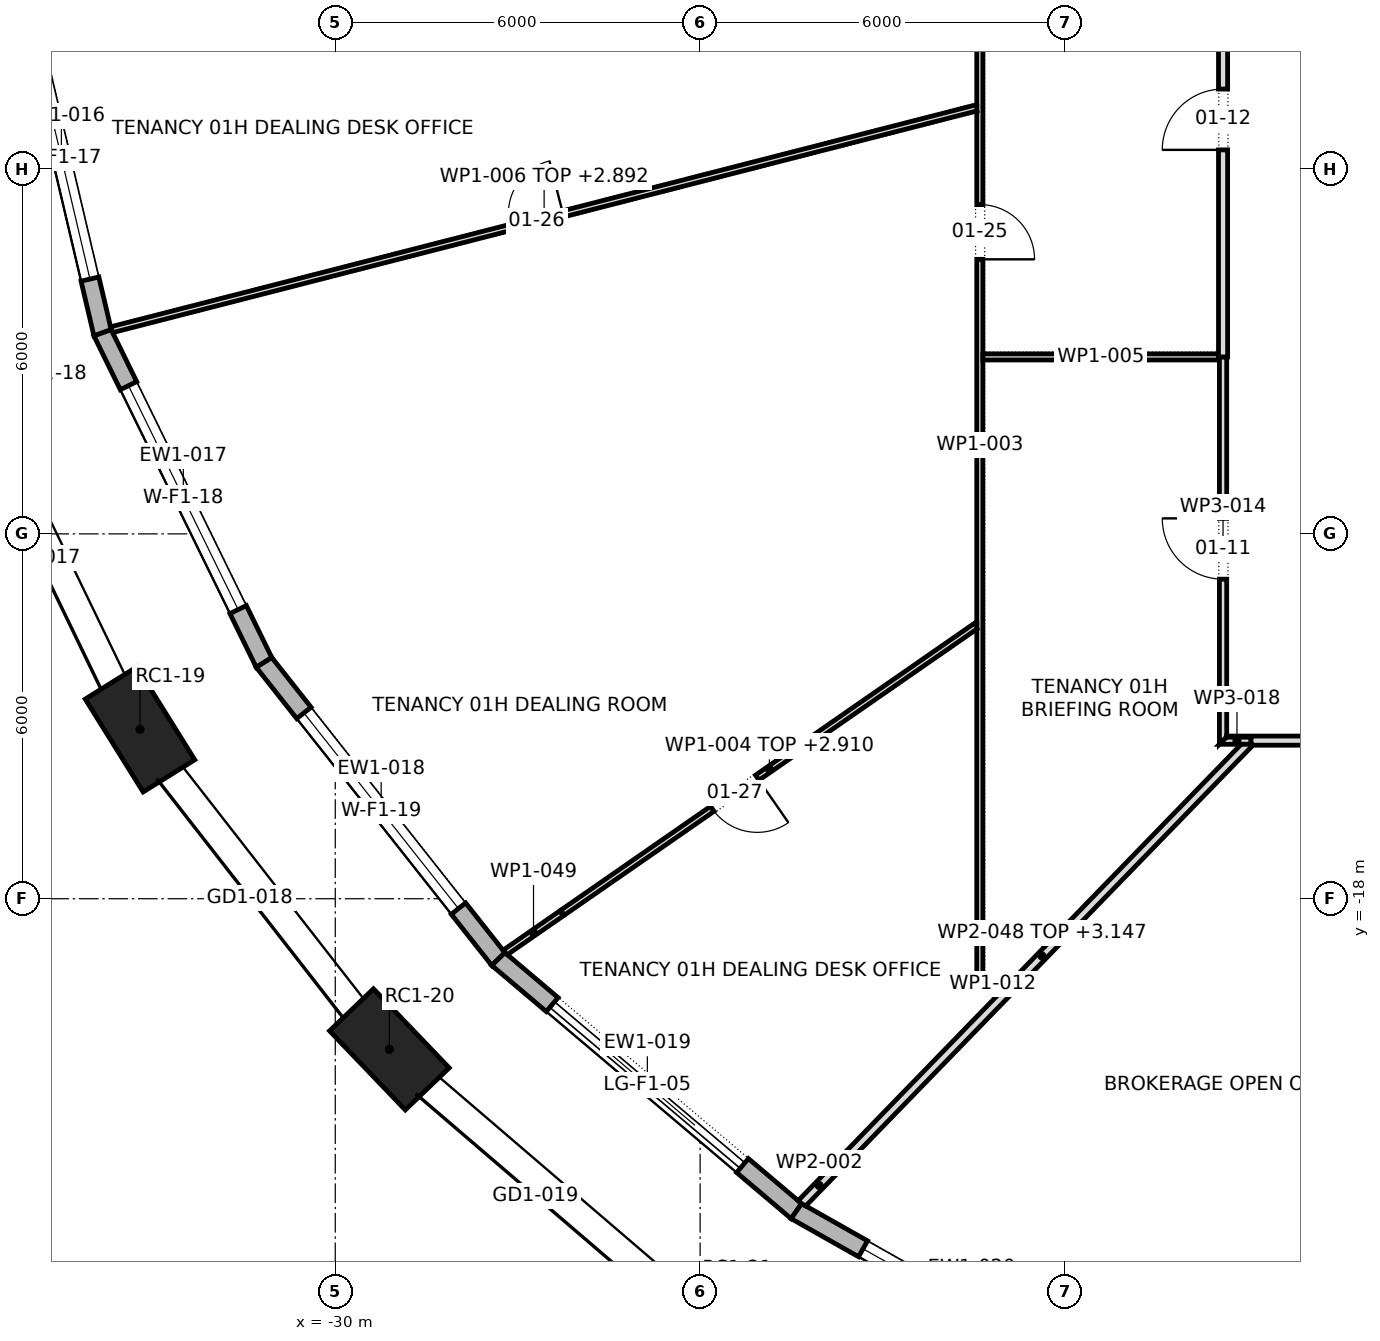
"""IFC4 building model, lengths in metres.
Left out: names, types, materials, properties, quantities, classifications, styles, units other than length and angle.
Written with IfcOpenShell. Run it as: python <this file> out.ifc"""

import sys

from ifc_helpers import new_model, si_unit, direction, frame, frame_2d, origin, origin_2d, place, context, subcontext, project, spatial, polyline, rectangle, outline, extrude, element, fill, save


model = new_model("IFC4")
c1 = context("Model", 3, precision=1e-05, world=origin(), true_north=direction((0.0, 1.0)))
c2 = subcontext(c1, "Body", "Model", "MODEL_VIEW")
j1 = project(units=[si_unit("LENGTHUNIT", "METRE"), si_unit("PLANEANGLEUNIT", "RADIAN")], contexts=[c1])
p1 = place(None, origin())
s1 = spatial("IfcSite", under=j1, at=p1, CompositionType="ELEMENT")
p2 = place(p1, origin())
s2 = spatial("IfcBuilding", under=s1, at=p2, CompositionType="ELEMENT")
p3 = place(p2, frame((0.0, 0.0, 31.9)))
s3 = spatial("IfcBuildingStorey", under=s2, at=p3, CompositionType="ELEMENT", Elevation=31.9)
for number, where, z_axis, x_axis in (
    (1, (-33.211, -15.216, 0.0), (0.0, 0.0, 1.0), (0.529, -0.849, 0.0)),
    (2, (-29.11, -20.477, 0.0), (0.0, 0.0, 1.0), (0.692, -0.722, 0.0)),
):
    element("IfcColumn", number, at=place(p3, frame(where, z_axis=z_axis, x_axis=x_axis)), inside=s3, PredefinedType="COLUMN", context=c2, shape_type="SweptSolid", body=[
        extrude(rectangle(XDim=1.8, YDim=1.0, at=origin_2d()), origin(), (0.0, 0.0, 1.0), 4.2),
    ])
p4 = place(p3, frame((-35.18, -2.936, 0.0), z_axis=(0.0, 0.0, 1.0), x_axis=(0.228924296831, -0.973444228665, 0.0)))
e3 = element("IfcWall", 3, at=p4, inside=s3, PredefinedType="STANDARD", context=c2, shape_type="SweptSolid", body=[
    extrude(outline(polyline([(-0.017, -0.15), (5.931, -0.15), (5.898, 0.15), (0.017, 0.15), (-0.017, -0.15)])), origin(), (0.0, 0.0, 1.0), 3.9),
])
p5 = place(p4, frame((0.907, 0.0, 0.6)))
e4 = element("IfcOpeningElement", 4, at=p5, cuts=e3, PredefinedType="OPENING", context=c2, shape_type="SweptSolid", body=[
    extrude(rectangle(XDim=4.1, YDim=2.85, at=frame_2d((2.05, 1.425))), frame((0.0, 0.162, 0.0), z_axis=(0.0, -1.0, 0.0), x_axis=(1.0, 0.0, 0.0)), (0.0, 0.0, 1.0), 0.324),
])
p6 = place(p3, frame((-33.826, -8.693, 0.0), z_axis=(0.0, 0.0, 1.0), x_axis=(0.439821516427, -0.898085204025, 0.0)))
e5 = element("IfcWall", 5, at=p6, inside=s3, PredefinedType="STANDARD", context=c2, shape_type="SweptSolid", body=[
    extrude(outline(polyline([(-0.017, -0.15), (6.053, -0.15), (6.021, 0.15), (0.017, 0.15), (-0.017, -0.15)])), origin(), (0.0, 0.0, 1.0), 3.9),
])
p7 = place(p6, frame((0.969, 0.0, 0.6)))
e6 = element("IfcOpeningElement", 6, at=p7, cuts=e5, PredefinedType="OPENING", context=c2, shape_type="SweptSolid", body=[
    extrude(rectangle(XDim=4.1, YDim=2.85, at=frame_2d((2.05, 1.425))), frame((0.0, 0.162, 0.0), z_axis=(0.0, -1.0, 0.0), x_axis=(1.0, 0.0, 0.0)), (0.0, 0.0, 1.0), 0.324),
])
p8 = place(p3, frame((-31.171, -14.115, 0.0), z_axis=(0.0, 0.0, 1.0), x_axis=(0.619902786528, -0.784678619089, 0.0)))
e7 = element("IfcWall", 7, at=p8, inside=s3, PredefinedType="STANDARD", context=c2, shape_type="SweptSolid", body=[
    extrude(outline(polyline([(-0.016, -0.15), (6.231, -0.15), (6.2, 0.15), (0.016, 0.15), (-0.016, -0.15)])), origin(), (0.0, 0.0, 1.0), 3.9),
])
p9 = place(p8, frame((1.058, 0.0, 0.6)))
e8 = element("IfcOpeningElement", 8, at=p9, cuts=e7, PredefinedType="OPENING", context=c2, shape_type="SweptSolid", body=[
    extrude(rectangle(XDim=4.1, YDim=2.85, at=frame_2d((2.05, 1.425))), frame((0.0, 0.162, 0.0), z_axis=(0.0, -1.0, 0.0), x_axis=(1.0, 0.0, 0.0)), (0.0, 0.0, 1.0), 0.324),
])
p10 = place(p3, frame((-27.318, -18.992, 0.0), z_axis=(0.0, 0.0, 1.0), x_axis=(0.763540615407, -0.645759807223, 0.0)))
e9 = element("IfcWall", 9, at=p10, inside=s3, PredefinedType="STANDARD", context=c2, shape_type="SweptSolid", body=[
    extrude(outline(polyline([(-0.015, -0.15), (6.434, -0.15), (6.406, 0.15), (0.015, 0.15), (-0.015, -0.15)])), origin(), (0.0, 0.0, 1.0), 3.9),
])
p11 = place(p10, frame((1.16, 0.0, 0.0)))
e10 = element("IfcOpeningElement", 10, at=p11, cuts=e9, PredefinedType="OPENING", context=c2, shape_type="SweptSolid", body=[
    extrude(rectangle(XDim=4.1, YDim=3.45, at=frame_2d((2.05, 1.725))), frame((0.0, 0.162, 0.0), z_axis=(0.0, -1.0, 0.0), x_axis=(1.0, 0.0, 0.0)), (0.0, 0.0, 1.0), 0.324),
])
p12 = place(p3, frame((-22.417, -23.137, 0.0), z_axis=(0.0, 0.0, 1.0), x_axis=(0.8705786416, -0.492029296678, 0.0)))
e11 = element("IfcWall", 11, at=p12, inside=s3, PredefinedType="STANDARD", context=c2, shape_type="SweptSolid", body=[
    extrude(outline(polyline([(-0.014, -0.15), (6.631, -0.15), (6.604, 0.15), (0.014, 0.15), (-0.014, -0.15)])), origin(), (0.0, 0.0, 1.0), 3.9),
])
p13 = place(p12, frame((1.259, 0.0, 0.6)))
e12 = element("IfcOpeningElement", 12, at=p13, cuts=e11, PredefinedType="OPENING", context=c2, shape_type="SweptSolid", body=[
    extrude(rectangle(XDim=4.1, YDim=2.85, at=frame_2d((2.05, 1.425))), frame((0.0, 0.162, 0.0), z_axis=(0.0, -1.0, 0.0), x_axis=(1.0, 0.0, 0.0)), (0.0, 0.0, 1.0), 0.324),
])
p14 = place(p3, frame((-22.333, -23.018, 0.0), z_axis=(0.0, 0.0, 1.0), x_axis=(0.696297301531, 0.717753486846, 0.0)))
e13 = element("IfcWall", 13, at=p14, inside=s3, PredefinedType="PARTITIONING", context=c2, shape_type="SweptSolid", body=[
    extrude(outline(polyline([(0.0, 0.075), (0.0, 0.072), (0.005, 0.001), (0.025, -0.075), (0.831, -0.075), (0.831, 0.075), (0.0, 0.075)])), origin(), (0.0, 0.0, 1.0), 3.9),
])
p15 = place(p3, frame((-19.4, -19.45, 0.0), z_axis=(0.0, 0.0, 1.0), x_axis=(0.0, 1.0, 0.0)))
e14 = element("IfcWall", 14, at=p15, inside=s3, PredefinedType="PARTITIONING", context=c2, shape_type="SweptSolid", body=[
    extrude(outline(polyline([(0.1, -0.05), (1.802, -0.05), (3.503, -0.05), (5.205, -0.05), (6.907, -0.05), (8.608, -0.05), (10.31, -0.05), (10.31, -0.05), (10.41, -0.05), (10.41, -0.05), (12.25, -0.05), (14.089, -0.05), (15.929, -0.05), (17.769, -0.05), (17.769, -0.047), (17.761, 0.044), (17.769, 0.044), (17.769, 0.045), (17.751, 0.044), (17.75, 0.05), (16.082, 0.05), (14.413, 0.05), (14.406, 0.048), (14.406, 0.05), (12.702, 0.05), (10.999, 0.05), (9.296, 0.05), (7.593, 0.05), (5.89, 0.05), (5.886, 0.048), (5.885, 0.05), (3.923, 0.05), (1.961, 0.05), (0.0, 0.05), (0.1, -0.05), (0.1, -0.05)])), origin(), (0.0, 0.0, 1.0), 3.9),
])
p16 = place(p15, frame((11.965, 0.0, 0.0)))
e15 = element("IfcOpeningElement", 15, at=p16, cuts=e14, PredefinedType="OPENING", context=c2, shape_type="SweptSolid", body=[
    extrude(rectangle(XDim=0.9, YDim=2.1, at=frame_2d((0.45, 1.05))), frame((0.0, 0.062, 0.0), z_axis=(0.0, -1.0, 0.0), x_axis=(1.0, 0.0, 0.0)), (0.0, 0.0, 1.0), 0.124),
])
p17 = place(p3, frame((-19.422, -13.485, 0.0), z_axis=(0.0, 0.0, 1.0), x_axis=(-0.821712123272, -0.569902786858, 0.0)))
e16 = element("IfcWall", 16, at=p17, inside=s3, PredefinedType="PARTITIONING", context=c2, shape_type="SweptSolid", body=[
    extrude(outline(polyline([(8.335, 0.05), (6.682, 0.05), (5.029, 0.05), (3.375, 0.05), (1.722, 0.05), (0.069, 0.05), (0.0, -0.049), (0.0, -0.05), (1.667, -0.05), (3.334, -0.05), (5.001, -0.05), (6.668, -0.05), (8.335, -0.05), (8.335, 0.05)])), origin(), (0.0, 0.0, 1.0), 2.91),
])
p18 = place(p17, frame((4.428, 0.0, 0.0)))
e17 = element("IfcOpeningElement", 17, at=p18, cuts=e16, PredefinedType="OPENING", context=c2, shape_type="SweptSolid", body=[
    extrude(rectangle(XDim=0.9, YDim=2.1, at=frame_2d((0.45, 1.05))), frame((0.0, 0.062, 0.0), z_axis=(0.0, -1.0, 0.0), x_axis=(1.0, 0.0, 0.0)), (0.0, 0.0, 1.0), 0.124),
])
p19 = place(p3, frame((-19.35, -9.09, 0.0), z_axis=(0.0, 0.0, 1.0), x_axis=(1.0, 0.0, 0.0)))
e18 = element("IfcWall", 18, at=p19, inside=s3, PredefinedType="PARTITIONING", context=c2, shape_type="SweptSolid", body=[
    extrude(outline(polyline([(3.89, -0.05), (3.89, 0.0), (3.875, 0.0), (3.875, 0.05), (1.938, 0.05), (0.0, 0.05), (0.0, -0.05), (1.945, -0.05), (3.89, -0.05)])), origin(), (0.0, 0.0, 1.0), 3.9),
])
p20 = place(p3, frame((-19.438, -4.99, 0.0), z_axis=(0.0, 0.0, 1.0), x_axis=(-0.968638974519, -0.248472407007, 0.0)))
e19 = element("IfcWall", 19, at=p20, inside=s3, PredefinedType="PARTITIONING", context=c2, shape_type="SweptSolid", body=[
    extrude(outline(polyline([(14.706, -0.05), (14.706, 0.004), (14.697, 0.05), (12.863, 0.05), (11.029, 0.05), (9.195, 0.05), (7.361, 0.05), (5.527, 0.05), (3.693, 0.05), (1.859, 0.05), (0.025, 0.05), (0.0, -0.049), (0.0, -0.05), (1.838, -0.05), (3.677, -0.05), (5.515, -0.05), (7.353, -0.05), (9.191, -0.05), (11.03, -0.05), (12.868, -0.05), (14.706, -0.05)])), origin(), (0.0, 0.0, 1.0), 2.892),
])
p21 = place(p20, frame((7.037, 0.0, 0.0)))
e20 = element("IfcOpeningElement", 20, at=p21, cuts=e19, PredefinedType="OPENING", context=c2, shape_type="SweptSolid", body=[
    extrude(rectangle(XDim=0.9, YDim=2.1, at=frame_2d((0.45, 1.05))), frame((0.0, 0.062, 0.0), z_axis=(0.0, -1.0, 0.0), x_axis=(1.0, 0.0, 0.0)), (0.0, 0.0, 1.0), 0.124),
])
p22 = place(p3, frame((-18.972, -19.4, 0.0), z_axis=(0.0, 0.0, 1.0), x_axis=(-1.0, 0.0, 0.0)))
e21 = element("IfcWall", 21, at=p22, inside=s3, PredefinedType="PARTITIONING", context=c2, shape_type="SweptSolid", body=[
    extrude(outline(polyline([(0.0, -0.05), (0.377, -0.05), (0.478, 0.05), (0.0, 0.05), (0.0, -0.05)])), origin(), (0.0, 0.0, 1.0), 3.9),
])
p23 = place(p3, frame((-15.4, -15.46, 0.0), z_axis=(0.0, 0.0, 1.0), x_axis=(0.0, 1.0, 0.0)))
e22 = element("IfcWall", 22, at=p23, inside=s3, PredefinedType="PARTITIONING", context=c2, shape_type="SweptSolid", body=[
    extrude(outline(polyline([(6.37, 0.06), (4.777, 0.06), (3.185, 0.06), (1.593, 0.06), (0.0, 0.06), (0.12, -0.06), (1.683, -0.06), (3.245, -0.06), (4.807, -0.06), (6.37, -0.06), (6.37, 0.06)])), origin(), (0.0, 0.0, 1.0), 3.9),
])
p24 = place(p23, frame((2.715, 0.0, 0.0)))
e23 = element("IfcOpeningElement", 23, at=p24, cuts=e22, PredefinedType="OPENING", context=c2, shape_type="SweptSolid", body=[
    extrude(rectangle(XDim=1.0, YDim=2.1, at=frame_2d((0.5, 1.05))), frame((0.0, 0.072, 0.0), z_axis=(0.0, -1.0, 0.0), x_axis=(1.0, 0.0, 0.0)), (0.0, 0.0, 1.0), 0.144),
])
p25 = place(p3, frame((-15.4, -9.09, 0.0), z_axis=(0.0, 0.0, 1.0), x_axis=(0.0, 1.0, 0.0)))
e24 = element("IfcWall", 24, at=p25, inside=s3, PredefinedType="PARTITIONING", context=c2, shape_type="SweptSolid", body=[
    extrude(outline(polyline([(0.0, -0.075), (1.878, -0.075), (3.756, -0.075), (5.634, -0.075), (7.512, -0.075), (9.39, -0.075), (11.269, -0.075), (13.146, -0.075), (15.025, -0.075), (16.903, -0.075), (18.781, -0.075), (20.659, -0.075), (22.537, -0.075), (24.415, -0.075), (24.565, 0.075), (22.675, 0.075), (20.786, 0.075), (18.896, 0.075), (17.007, 0.075), (15.117, 0.075), (13.227, 0.075), (11.338, 0.075), (9.448, 0.075), (7.558, 0.075), (5.669, 0.075), (3.779, 0.075), (1.89, 0.075), (0.0, 0.075), (0.0, -0.075)])), origin(), (0.0, 0.0, 1.0), 3.9),
])
p26 = place(p25, frame((19.77, 0.0, 0.0)))
e25 = element("IfcOpeningElement", 25, at=p26, cuts=e24, PredefinedType="OPENING", context=c2, shape_type="SweptSolid", body=[
    extrude(rectangle(XDim=1.0, YDim=2.1, at=frame_2d((0.5, 1.05))), frame((0.0, 0.087, 0.0), z_axis=(0.0, -1.0, 0.0), x_axis=(1.0, 0.0, 0.0)), (0.0, 0.0, 1.0), 0.174),
])
p27 = place(p25, frame((11.43, 0.0, 0.0)))
e26 = element("IfcOpeningElement", 26, at=p27, cuts=e24, PredefinedType="OPENING", context=c2, shape_type="SweptSolid", body=[
    extrude(rectangle(XDim=1.0, YDim=2.1, at=frame_2d((0.5, 1.05))), frame((0.0, 0.087, 0.0), z_axis=(0.0, -1.0, 0.0), x_axis=(1.0, 0.0, 0.0)), (0.0, 0.0, 1.0), 0.174),
])
p28 = place(p25, frame((3.405, 0.0, 0.0)))
e27 = element("IfcOpeningElement", 27, at=p28, cuts=e24, PredefinedType="OPENING", context=c2, shape_type="SweptSolid", body=[
    extrude(rectangle(XDim=1.0, YDim=2.1, at=frame_2d((0.5, 1.05))), frame((0.0, 0.087, 0.0), z_axis=(0.0, -1.0, 0.0), x_axis=(1.0, 0.0, 0.0)), (0.0, 0.0, 1.0), 0.174),
])
p29 = place(p3, frame((-14.94, -15.4, 0.0), z_axis=(0.0, 0.0, 1.0), x_axis=(-1.0, 0.0, 0.0)))
e28 = element("IfcWall", 28, at=p29, inside=s3, PredefinedType="PARTITIONING", context=c2, shape_type="SweptSolid", body=[
    extrude(outline(polyline([(0.0, -0.06), (0.4, -0.06), (0.52, 0.06), (0.0, 0.06), (0.0, -0.06)])), origin(), (0.0, 0.0, 1.0), 3.9),
])
p30 = place(p3, frame((-5.52, -15.4, 0.0), z_axis=(0.0, 0.0, 1.0), x_axis=(-1.0, 0.0, 0.0)))
e29 = element("IfcWall", 29, at=p30, inside=s3, PredefinedType="PARTITIONING", context=c2, shape_type="SweptSolid", body=[
    extrude(outline(polyline([(0.0, -0.075), (1.964, -0.075), (3.928, -0.075), (5.892, -0.075), (7.856, -0.075), (9.82, -0.075), (9.82, -0.06), (9.42, -0.06), (9.42, 0.045), (9.389, 0.075), (7.532, 0.075), (5.676, 0.075), (3.82, 0.075), (1.963, 0.075), (0.106, 0.075), (0.083, 0.01), (0.0, 0.039), (0.0, -0.075)])), origin(), (0.0, 0.0, 1.0), 3.9),
])
p31 = place(p30, frame((4.21, 0.0, 0.0)))
e30 = element("IfcOpeningElement", 30, at=p31, cuts=e29, PredefinedType="OPENING", context=c2, shape_type="SweptSolid", body=[
    extrude(rectangle(XDim=1.0, YDim=2.1, at=frame_2d((0.5, 1.05))), frame((0.0, 0.087, 0.0), z_axis=(0.0, -1.0, 0.0), x_axis=(1.0, 0.0, 0.0)), (0.0, 0.0, 1.0), 0.174),
])
p32 = place(p3, frame((-21.755, -22.421, 0.0), z_axis=(0.0, 0.0, 1.0), x_axis=(0.69648940436, 0.717567076735, 0.0)))
e31 = element("IfcWall", 31, at=p32, inside=s3, PredefinedType="PARTITIONING", context=c2, shape_type="SweptSolid", body=[
    extrude(outline(polyline([(9.753, -0.075), (9.753, -0.074), (9.731, -0.052), (9.742, -0.042), (9.682, 0.02), (9.682, 0.02), (9.629, 0.075), (7.777, 0.075), (5.925, 0.075), (4.073, 0.075), (4.07, 0.073), (4.068, 0.075), (2.712, 0.075), (1.356, 0.075), (0.0, 0.075), (0.0, -0.075), (1.95, -0.075), (3.901, -0.075), (5.852, -0.075), (7.802, -0.075), (9.753, -0.075)])), origin(), (0.0, 0.0, 1.0), 3.147),
])
p33 = place(p3, frame((-26.271, -18.235, 0.0), z_axis=(0.0, 0.0, 1.0), x_axis=(-0.821716387249, -0.56989663881, 0.0)))
e32 = element("IfcWall", 32, at=p33, inside=s3, PredefinedType="PARTITIONING", context=c2, shape_type="SweptSolid", body=[
    extrude(outline(polyline([(0.0, -0.05), (1.146, -0.05), (1.143, 0.0), (1.129, 0.05), (0.0, 0.05), (0.0, -0.05)])), origin(), (0.0, 0.0, 1.0), 3.9),
])
p34 = place(p5, origin())
e33 = element("IfcWindow", 33, at=p34, inside=s3, PartitioningType="TRIPLE_PANEL_VERTICAL", PredefinedType="WINDOW", context=c2, shape_type="SweptSolid", body=[
    extrude(rectangle(XDim=4.1, YDim=2.85, at=frame_2d((2.05, 1.425))), frame((0.0, 0.03, 0.0), z_axis=(0.0, -1.0, 0.0), x_axis=(1.0, 0.0, 0.0)), (0.0, 0.0, 1.0), 0.06),
])
fill(e4, e33)
p35 = place(p7, origin())
e34 = element("IfcWindow", 34, at=p35, inside=s3, PartitioningType="TRIPLE_PANEL_VERTICAL", PredefinedType="WINDOW", context=c2, shape_type="SweptSolid", body=[
    extrude(rectangle(XDim=4.1, YDim=2.85, at=frame_2d((2.05, 1.425))), frame((0.0, 0.03, 0.0), z_axis=(0.0, -1.0, 0.0), x_axis=(1.0, 0.0, 0.0)), (0.0, 0.0, 1.0), 0.06),
])
fill(e6, e34)
p36 = place(p9, origin())
e35 = element("IfcWindow", 35, at=p36, inside=s3, PartitioningType="TRIPLE_PANEL_VERTICAL", PredefinedType="WINDOW", context=c2, shape_type="SweptSolid", body=[
    extrude(rectangle(XDim=4.1, YDim=2.85, at=frame_2d((2.05, 1.425))), frame((0.0, 0.03, 0.0), z_axis=(0.0, -1.0, 0.0), x_axis=(1.0, 0.0, 0.0)), (0.0, 0.0, 1.0), 0.06),
])
fill(e8, e35)
p37 = place(p11, origin())
e36 = element("IfcDoor", 36, at=p37, inside=s3, OperationType="DOUBLE_DOOR_SLIDING", PredefinedType="DOOR", context=c2, shape_type="SweptSolid", body=[
    extrude(rectangle(XDim=4.1, YDim=3.45, at=frame_2d((2.05, 1.725))), frame((0.0, 0.025, 0.0), z_axis=(0.0, -1.0, 0.0), x_axis=(1.0, 0.0, 0.0)), (0.0, 0.0, 1.0), 0.05),
])
fill(e10, e36)
p38 = place(p13, origin())
e37 = element("IfcWindow", 37, at=p38, inside=s3, PartitioningType="TRIPLE_PANEL_VERTICAL", PredefinedType="WINDOW", context=c2, shape_type="SweptSolid", body=[
    extrude(rectangle(XDim=4.1, YDim=2.85, at=frame_2d((2.05, 1.425))), frame((0.0, 0.03, 0.0), z_axis=(0.0, -1.0, 0.0), x_axis=(1.0, 0.0, 0.0)), (0.0, 0.0, 1.0), 0.06),
])
fill(e12, e37)
p39 = place(p24, origin())
e38 = element("IfcDoor", 38, at=p39, inside=s3, OperationType="SINGLE_SWING_LEFT", PredefinedType="DOOR", context=c2, shape_type="SweptSolid", body=[
    extrude(rectangle(XDim=1.0, YDim=2.1, at=frame_2d((0.5, 1.05))), frame((0.0, 0.025, 0.0), z_axis=(0.0, -1.0, 0.0), x_axis=(1.0, 0.0, 0.0)), (0.0, 0.0, 1.0), 0.05),
])
fill(e23, e38)
p40 = place(p28, origin())
e39 = element("IfcDoor", 39, at=p40, inside=s3, OperationType="SINGLE_SWING_RIGHT", PredefinedType="DOOR", context=c2, shape_type="SweptSolid", body=[
    extrude(rectangle(XDim=1.0, YDim=2.1, at=frame_2d((0.5, 1.05))), frame((0.0, 0.025, 0.0), z_axis=(0.0, -1.0, 0.0), x_axis=(1.0, 0.0, 0.0)), (0.0, 0.0, 1.0), 0.05),
])
fill(e27, e39)
p41 = place(p16, frame((0.9, 0.0, 0.0), z_axis=(0.0, 0.0, 1.0), x_axis=(-1.0, 0.0, 0.0)))
e40 = element("IfcDoor", 40, at=p41, inside=s3, OperationType="SINGLE_SWING_LEFT", PredefinedType="DOOR", context=c2, shape_type="SweptSolid", body=[
    extrude(rectangle(XDim=0.9, YDim=2.1, at=frame_2d((0.45, 1.05))), frame((0.0, 0.025, 0.0), z_axis=(0.0, -1.0, 0.0), x_axis=(1.0, 0.0, 0.0)), (0.0, 0.0, 1.0), 0.05),
])
fill(e15, e40)
p42 = place(p21, frame((0.9, 0.0, 0.0), z_axis=(0.0, 0.0, 1.0), x_axis=(-1.0, 0.0, 0.0)))
e41 = element("IfcDoor", 41, at=p42, inside=s3, OperationType="SINGLE_SWING_LEFT", PredefinedType="DOOR", context=c2, shape_type="SweptSolid", body=[
    extrude(rectangle(XDim=0.9, YDim=2.1, at=frame_2d((0.45, 1.05))), frame((0.0, 0.025, 0.0), z_axis=(0.0, -1.0, 0.0), x_axis=(1.0, 0.0, 0.0)), (0.0, 0.0, 1.0), 0.05),
])
fill(e20, e41)
p43 = place(p18, origin())
e42 = element("IfcDoor", 42, at=p43, inside=s3, OperationType="SINGLE_SWING_RIGHT", PredefinedType="DOOR", context=c2, shape_type="SweptSolid", body=[
    extrude(rectangle(XDim=0.9, YDim=2.1, at=frame_2d((0.45, 1.05))), frame((0.0, 0.025, 0.0), z_axis=(0.0, -1.0, 0.0), x_axis=(1.0, 0.0, 0.0)), (0.0, 0.0, 1.0), 0.05),
])
fill(e17, e42)
save(model, sys.argv[1])
